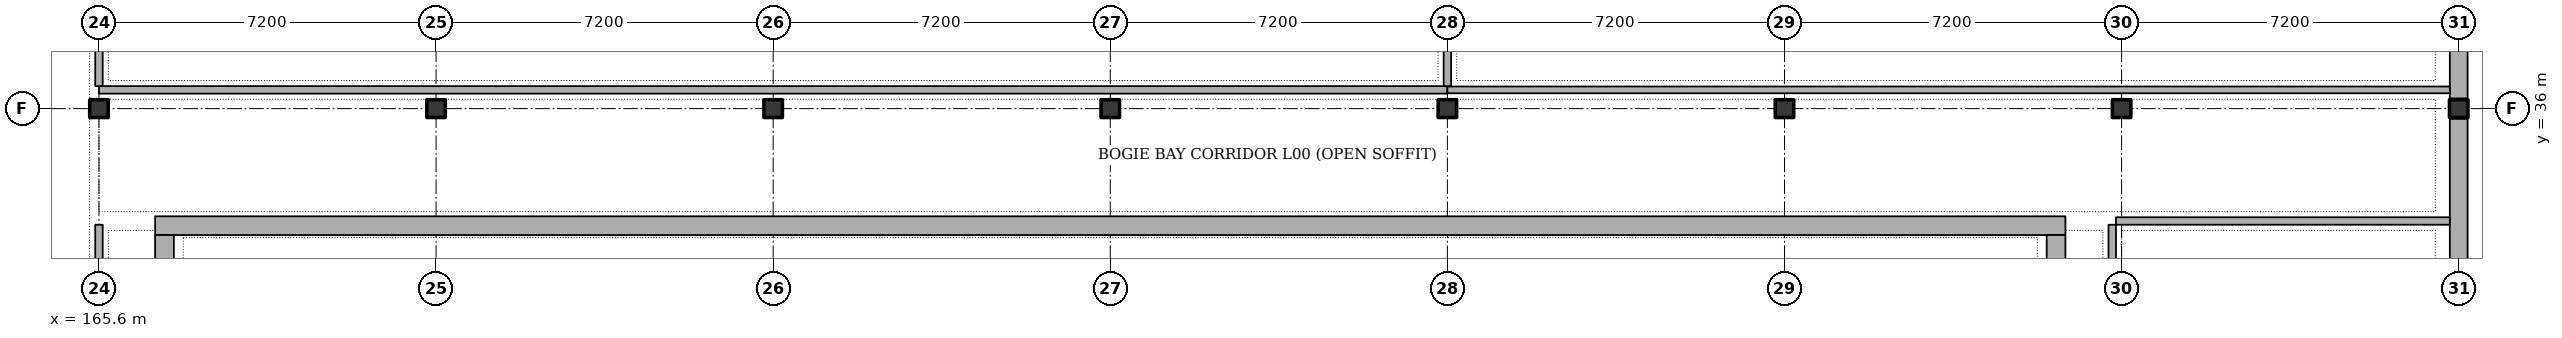
"""IFC4 building model, lengths in metres.
Left out: names, types, materials, properties, quantities, classifications, styles, units other than length and angle.
Written with IfcOpenShell. Run it as: python <this file> out.ifc"""

import sys

from ifc_helpers import new_model, si_unit, direction, frame, frame_2d, origin, origin_2d, place, context, subcontext, project, spatial, rectangle, i_section, extrude, element, fill, save


model = new_model("IFC4")
c1 = context("Model", 3, precision=1e-05, world=origin(), true_north=direction((0.0, 1.0)))
c2 = subcontext(c1, "Body", "Model", "MODEL_VIEW")
j1 = project(units=[si_unit("LENGTHUNIT", "METRE"), si_unit("PLANEANGLEUNIT", "RADIAN")], contexts=[c1])
p1 = place(None, origin())
s1 = spatial("IfcSite", under=j1, at=p1, CompositionType="ELEMENT")
p2 = place(p1, origin())
s2 = spatial("IfcBuilding", under=s1, at=p2, CompositionType="ELEMENT")
p3 = place(p2, origin())
s3 = spatial("IfcBuildingStorey", under=s2, at=p3, CompositionType="ELEMENT", Elevation=0.0)
p4 = place(p3, frame((166.8, 33.5, -2.2), z_axis=(0.0, 0.0, 1.0), x_axis=(1.0, 0.0, 0.0)))
e1 = element("IfcWall", 1, at=p4, inside=s3, PredefinedType="USERDEFINED", context=c2, shape_type="SweptSolid", body=[
    extrude(rectangle(XDim=40.8, YDim=0.4, at=frame_2d((20.4, 0.0))), origin(), (0.0, 0.0, 1.0), 2.2),
])
for number, where, z_axis, x_axis in (
    (2, (167.0, 31.5, -2.2), (0.0, 0.0, 1.0), (0.0, 1.0, 0.0)),
    (3, (207.4, 31.5, -2.2), (0.0, 0.0, 1.0), (0.0, 1.0, 0.0)),
):
    element("IfcWall", number, at=place(p3, frame(where, z_axis=z_axis, x_axis=x_axis)), inside=s3, PredefinedType="USERDEFINED", context=c2, shape_type="SweptSolid", body=[
        extrude(rectangle(XDim=1.8, YDim=0.4, at=frame_2d((0.9, 0.0))), origin(), (0.0, 0.0, 1.0), 2.2),
    ])
for number, where, z_axis, x_axis in (
    (4, (165.6, 36.0, -0.3), (0.0, 0.0, 1.0), (1.0, 0.0, 0.0)),
    (5, (172.8, 36.0, -0.3), (0.0, 0.0, 1.0), (1.0, 0.0, 0.0)),
    (6, (180.0, 36.0, -0.3), (0.0, 0.0, 1.0), (1.0, 0.0, 0.0)),
    (7, (187.2, 36.0, -0.3), (0.0, 0.0, 1.0), (1.0, 0.0, 0.0)),
    (8, (194.4, 36.0, -0.3), (0.0, 0.0, 1.0), (1.0, 0.0, 0.0)),
    (9, (201.6, 36.0, -0.3), (0.0, 0.0, 1.0), (1.0, 0.0, 0.0)),
    (10, (208.8, 36.0, -0.3), (0.0, 0.0, 1.0), (1.0, 0.0, 0.0)),
    (11, (216.0, 36.0, -0.3), (0.0, 0.0, 1.0), (1.0, 0.0, 0.0)),
):
    element("IfcColumn", number, at=place(p3, frame(where, z_axis=z_axis, x_axis=x_axis)), inside=s3, PredefinedType="COLUMN", context=c2, shape_type="SweptSolid", body=[
        extrude(i_section(OverallWidth=0.395, OverallDepth=0.381, WebThickness=0.018, FlangeThickness=0.03, FilletRadius=0.015, at=origin_2d()), origin(), (0.0, 0.0, 1.0), 5.7),
    ])
p5 = place(p3, frame((216.0, 42.983, 0.0), z_axis=(0.0, 0.0, 1.0), x_axis=(0.0, -1.0, 0.0)))
e12 = element("IfcWall", 12, at=p5, inside=s3, PredefinedType="SOLIDWALL", context=c2, shape_type="SweptSolid", body=[
    extrude(rectangle(XDim=6.765, YDim=0.38, at=frame_2d((3.383, 0.0))), origin(), (0.0, 0.0, 1.0), 4.413),
])
p6 = place(p5, frame((2.408, 0.0, 1.05)))
e13 = element("IfcOpeningElement", 13, at=p6, cuts=e12, PredefinedType="OPENING", context=c2, shape_type="SweptSolid", body=[
    extrude(rectangle(XDim=1.95, YDim=2.25, at=frame_2d((0.975, 1.125))), frame((0.0, 0.2, 0.0), z_axis=(0.0, -1.0, 0.0), x_axis=(1.0, 0.0, 0.0)), (0.0, 0.0, 1.0), 0.4),
])
p7 = place(p3, frame((216.0, 35.783, 0.0), z_axis=(0.0, 0.0, 1.0), x_axis=(0.0, -1.0, 0.0)))
e14 = element("IfcWall", 14, at=p7, inside=s3, PredefinedType="SOLIDWALL", context=c2, shape_type="SweptSolid", body=[
    extrude(rectangle(XDim=6.765, YDim=0.38, at=frame_2d((3.383, 0.0))), origin(), (0.0, 0.0, 1.0), 4.413),
])
p8 = place(p7, frame((1.583, 0.0, 0.0)))
e15 = element("IfcOpeningElement", 15, at=p8, cuts=e14, PredefinedType="OPENING", context=c2, shape_type="SweptSolid", body=[
    extrude(rectangle(XDim=3.6, YDim=4.2, at=frame_2d((1.8, 2.1))), frame((0.0, 0.2, 0.0), z_axis=(0.0, -1.0, 0.0), x_axis=(1.0, 0.0, 0.0)), (0.0, 0.0, 1.0), 0.4),
])
p9 = place(p3, frame((165.6, 36.4, 0.0), z_axis=(0.0, 0.0, 1.0), x_axis=(1.0, 0.0, 0.0)))
e16 = element("IfcWall", 16, at=p9, inside=s3, PredefinedType="PARTITIONING", context=c2, shape_type="SweptSolid", body=[
    extrude(rectangle(XDim=28.8, YDim=0.16, at=frame_2d((14.4, 0.0))), origin(), (0.0, 0.0, 1.0), 3.55),
])
p10 = place(p9, frame((10.224, 0.0, 0.0)))
e17 = element("IfcOpeningElement", 17, at=p10, cuts=e16, PredefinedType="OPENING", context=c2, shape_type="SweptSolid", body=[
    extrude(rectangle(XDim=1.75, YDim=2.25, at=frame_2d((0.875, 1.125))), frame((0.0, 0.09, 0.0), z_axis=(0.0, -1.0, 0.0), x_axis=(1.0, 0.0, 0.0)), (0.0, 0.0, 1.0), 0.18),
])
p11 = place(p3, frame((194.4, 36.4, 0.0), z_axis=(0.0, 0.0, 1.0), x_axis=(1.0, 0.0, 0.0)))
e18 = element("IfcWall", 18, at=p11, inside=s3, PredefinedType="PARTITIONING", context=c2, shape_type="SweptSolid", body=[
    extrude(rectangle(XDim=21.41, YDim=0.145, at=frame_2d((10.705, 0.0))), origin(), (0.0, 0.0, 1.0), 3.55),
])
p12 = place(p11, frame((2.684, 0.0, 0.0)))
e19 = element("IfcOpeningElement", 19, at=p12, cuts=e18, PredefinedType="OPENING", context=c2, shape_type="SweptSolid", body=[
    extrude(rectangle(XDim=1.75, YDim=2.25, at=frame_2d((0.875, 1.125))), frame((0.0, 0.083, 0.0), z_axis=(0.0, -1.0, 0.0), x_axis=(1.0, 0.0, 0.0)), (0.0, 0.0, 1.0), 0.165),
])
for number, where, z_axis, x_axis in (
    (20, (165.6, 28.992, 0.0), (0.0, 0.0, 1.0), (0.0, 1.0, 0.0)),
    (21, (208.6, 28.992, 0.0), (0.0, 0.0, 1.0), (0.0, 1.0, 0.0)),
):
    element("IfcWall", number, at=place(p3, frame(where, z_axis=z_axis, x_axis=x_axis)), inside=s3, PredefinedType="PARTITIONING", context=c2, shape_type="SweptSolid", body=[
        extrude(rectangle(XDim=4.528, YDim=0.16, at=frame_2d((2.264, 0.0))), origin(), (0.0, 0.0, 1.0), 3.55),
    ])
p13 = place(p3, frame((208.68, 33.6, 0.0), z_axis=(0.0, 0.0, 1.0), x_axis=(1.0, 0.0, 0.0)))
e22 = element("IfcWall", 22, at=p13, inside=s3, PredefinedType="PARTITIONING", context=c2, shape_type="SweptSolid", body=[
    extrude(rectangle(XDim=7.13, YDim=0.16, at=frame_2d((3.565, 0.0))), origin(), (0.0, 0.0, 1.0), 3.55),
])
for number, where, z_axis, x_axis in (
    (23, (165.6, 36.48, 0.0), (0.0, 0.0, 1.0), (0.0, 1.0, 0.0)),
    (24, (194.4, 36.48, 0.0), (0.0, 0.0, 1.0), (0.0, 1.0, 0.0)),
):
    element("IfcWall", number, at=place(p3, frame(where, z_axis=z_axis, x_axis=x_axis)), inside=s3, PredefinedType="PARTITIONING", context=c2, shape_type="SweptSolid", body=[
        extrude(rectangle(XDim=6.528, YDim=0.16, at=frame_2d((3.264, 0.0))), origin(), (0.0, 0.0, 1.0), 3.55),
    ])
p14 = place(p8, origin())
e25 = element("IfcDoor", 25, at=p14, inside=s3, OperationType="ROLLINGUP", PredefinedType="GATE", context=c2, shape_type="SweptSolid", body=[
    extrude(rectangle(XDim=3.6, YDim=4.2, at=frame_2d((1.8, 2.1))), frame((0.0, 0.025, 0.0), z_axis=(0.0, -1.0, 0.0), x_axis=(1.0, 0.0, 0.0)), (0.0, 0.0, 1.0), 0.05),
])
fill(e15, e25)
p15 = place(p10, origin())
e26 = element("IfcDoor", 26, at=p15, inside=s3, OperationType="DOUBLE_SWING_LEFT", PredefinedType="DOOR", context=c2, shape_type="SweptSolid", body=[
    extrude(rectangle(XDim=1.75, YDim=2.25, at=frame_2d((0.875, 1.125))), frame((0.0, 0.025, 0.0), z_axis=(0.0, -1.0, 0.0), x_axis=(1.0, 0.0, 0.0)), (0.0, 0.0, 1.0), 0.05),
])
fill(e17, e26)
p16 = place(p12, origin())
e27 = element("IfcDoor", 27, at=p16, inside=s3, OperationType="DOUBLE_SWING_LEFT", PredefinedType="DOOR", context=c2, shape_type="SweptSolid", body=[
    extrude(rectangle(XDim=1.75, YDim=2.25, at=frame_2d((0.875, 1.125))), frame((0.0, 0.025, 0.0), z_axis=(0.0, -1.0, 0.0), x_axis=(1.0, 0.0, 0.0)), (0.0, 0.0, 1.0), 0.05),
])
fill(e19, e27)
save(model, sys.argv[1])
